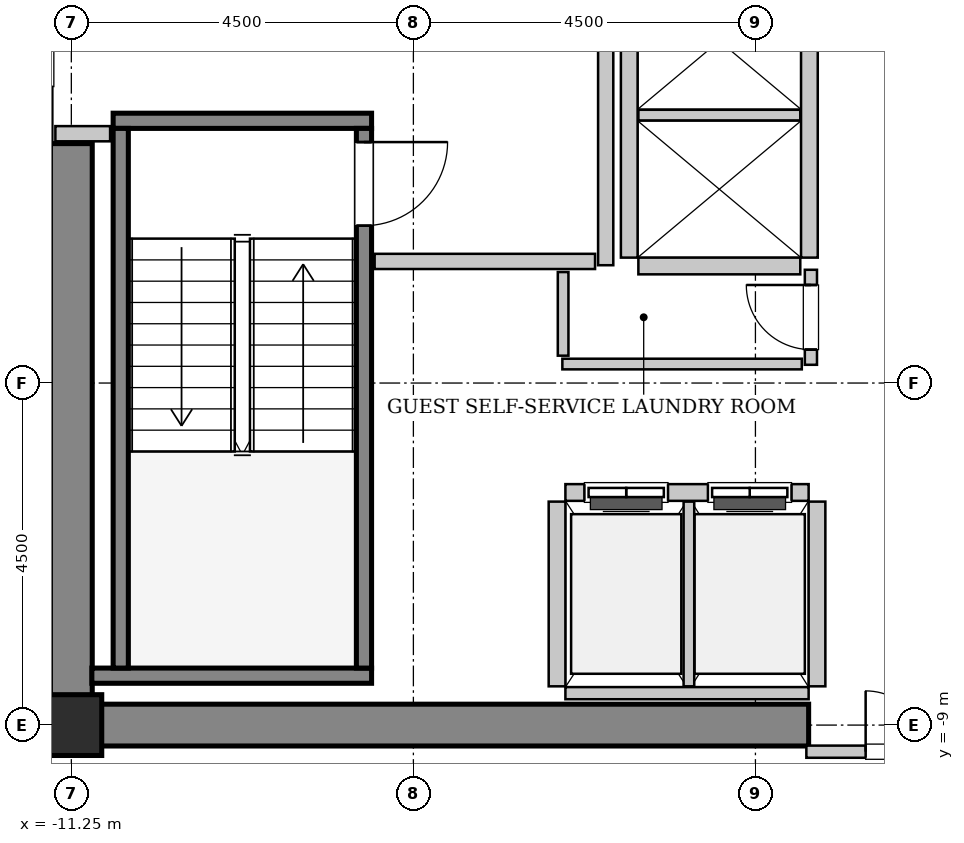
"""IFC4 building model, lengths in metres.
Left out: names, types, materials, properties, quantities, classifications, styles, units other than length and angle.
Written with IfcOpenShell. Run it as: python <this file> out.ifc"""

import sys

from ifc_helpers import new_model, si_unit, direction, frame, frame_2d, origin, origin_2d, place, context, subcontext, project, spatial, rectangle, hollow_rectangle, extrude, source, transform, mapped, element, fill, save


model = new_model("IFC4")
c1 = context("Model", 3, precision=1e-05, world=origin(), true_north=direction((0.0, 1.0)))
c2 = subcontext(c1, "Body", "Model", "MODEL_VIEW")
j1 = project(units=[si_unit("LENGTHUNIT", "METRE"), si_unit("PLANEANGLEUNIT", "RADIAN")], contexts=[c1])
p1 = place(None, origin())
s1 = spatial("IfcSite", under=j1, at=p1, CompositionType="ELEMENT")
p2 = place(p1, origin())
s2 = spatial("IfcBuilding", under=s1, at=p2, CompositionType="ELEMENT")
p3 = place(p2, frame((0.0, 0.0, 198.2)))
s3 = spatial("IfcBuildingStorey", under=s2, at=p3, CompositionType="ELEMENT", Elevation=198.2)
m1 = source(origin(), c2, "Body", "SweptSolid", [
    extrude(rectangle(XDim=9.975, YDim=0.55, at=frame_2d((4.987, 0.0))), origin(), (0.0, 0.0, 1.0), 3.8),
])
p4 = place(p3, frame((-11.525, -9.0, 0.0), z_axis=(0.0, 0.0, 1.0), x_axis=(1.0, 0.0, 0.0)))
e1 = element("IfcWall", 1, at=p4, inside=s3, PredefinedType="SHEAR", context=c2, shape_type="MappedRepresentation", body=[
    mapped(m1, transform((0.0, 0.0, 0.0), x_axis=(1.0, 0.0, 0.0), y_axis=(0.0, 1.0, 0.0), z_axis=(0.0, 0.0, 1.0), scale=1.0)),
])
m2 = source(origin(), c2, "Body", "SweptSolid", [
    extrude(rectangle(XDim=7.375, YDim=0.55, at=frame_2d((3.688, 0.0))), origin(), (0.0, 0.0, 1.0), 3.8),
])
p5 = place(p3, frame((-11.25, -8.725, 0.0), z_axis=(0.0, 0.0, 1.0), x_axis=(0.0, 1.0, 0.0)))
e2 = element("IfcWall", 2, at=p5, inside=s3, PredefinedType="SHEAR", context=c2, shape_type="MappedRepresentation", body=[
    mapped(m2, transform((0.0, 0.0, 0.0), x_axis=(1.0, 0.0, 0.0), y_axis=(0.0, 1.0, 0.0), z_axis=(0.0, 0.0, 1.0), scale=1.0)),
])
m3 = source(origin(), c2, "Body", "SweptSolid", [
    extrude(hollow_rectangle(XDim=0.8, YDim=0.8, WallThickness=0.04, InnerFilletRadius=0.04, OuterFilletRadius=0.08, at=origin_2d()), origin(), (0.0, 0.0, 1.0), 3.8),
])
p6 = place(p3, frame((-11.25, -9.0, 0.0), z_axis=(0.0, 0.0, 1.0), x_axis=(1.0, 0.0, 0.0)))
e3 = element("IfcColumn", 3, at=p6, inside=s3, PredefinedType="COLUMN", context=c2, shape_type="MappedRepresentation", body=[
    mapped(m3, transform((0.0, 0.0, 0.0), x_axis=(1.0, 0.0, 0.0), y_axis=(0.0, 1.0, 0.0), z_axis=(0.0, 0.0, 1.0), scale=1.0)),
])
m4 = source(origin(), c2, "Body", "SweptSolid", [
    extrude(rectangle(XDim=3.4, YDim=0.2, at=frame_2d((1.7, 0.0))), origin(), (0.0, 0.0, 1.0), 3.8),
])
p7 = place(p3, frame((-10.7, -1.05, 0.0), z_axis=(0.0, 0.0, 1.0), x_axis=(1.0, 0.0, 0.0)))
e4 = element("IfcWall", 4, at=p7, inside=s3, PredefinedType="SOLIDWALL", context=c2, shape_type="MappedRepresentation", body=[
    mapped(m4, transform((0.0, 0.0, 0.0), x_axis=(1.0, 0.0, 0.0), y_axis=(0.0, 1.0, 0.0), z_axis=(0.0, 0.0, 1.0), scale=1.0)),
])
m5 = source(origin(), c2, "Body", "SweptSolid", [
    extrude(rectangle(XDim=3.68, YDim=0.2, at=frame_2d((1.84, 0.0))), origin(), (0.0, 0.0, 1.0), 3.8),
])
p8 = place(p3, frame((-10.98, -8.35, 0.0), z_axis=(0.0, 0.0, 1.0), x_axis=(1.0, 0.0, 0.0)))
e5 = element("IfcWall", 5, at=p8, inside=s3, PredefinedType="SOLIDWALL", context=c2, shape_type="MappedRepresentation", body=[
    mapped(m5, transform((0.0, 0.0, 0.0), x_axis=(1.0, 0.0, 0.0), y_axis=(0.0, 1.0, 0.0), z_axis=(0.0, 0.0, 1.0), scale=1.0)),
])
m6 = source(origin(), c2, "Body", "SweptSolid", [
    extrude(rectangle(XDim=7.1, YDim=0.2, at=frame_2d((3.55, 0.0))), origin(), (0.0, 0.0, 1.0), 3.8),
])
p9 = place(p3, frame((-10.6, -1.15, 0.0), z_axis=(0.0, 0.0, 1.0), x_axis=(0.0, -1.0, 0.0)))
e6 = element("IfcWall", 6, at=p9, inside=s3, PredefinedType="SOLIDWALL", context=c2, shape_type="MappedRepresentation", body=[
    mapped(m6, transform((0.0, 0.0, 0.0), x_axis=(1.0, 0.0, 0.0), y_axis=(0.0, 1.0, 0.0), z_axis=(0.0, 0.0, 1.0), scale=1.0)),
])
p10 = place(p3, frame((-7.4, -1.15, 0.0), z_axis=(0.0, 0.0, 1.0), x_axis=(0.0, -1.0, 0.0)))
e7 = element("IfcWall", 7, at=p10, inside=s3, PredefinedType="SOLIDWALL", context=c2, shape_type="MappedRepresentation", body=[
    mapped(m6, transform((0.0, 0.0, 0.0), x_axis=(1.0, 0.0, 0.0), y_axis=(0.0, 1.0, 0.0), z_axis=(0.0, 0.0, 1.0), scale=1.0)),
])
p11 = place(p10, frame((0.18, 0.0, 0.0)))
e8 = element("IfcOpeningElement", 8, at=p11, cuts=e7, PredefinedType="OPENING", context=c2, shape_type="SweptSolid", body=[
    extrude(rectangle(XDim=1.1, YDim=2.15, at=frame_2d((0.55, 1.075))), frame((0.0, 0.11, 0.0), z_axis=(0.0, -1.0, 0.0), x_axis=(1.0, 0.0, 0.0)), (0.0, 0.0, 1.0), 0.22),
])
m7 = source(origin(), c2, "Body", "SweptSolid", [
    extrude(rectangle(XDim=3.2, YDim=0.22, at=frame_2d((1.6, 0.0))), origin(), (0.0, 0.0, 1.0), 3.485),
])
p12 = place(p3, frame((-1.55, -5.94, 0.0), z_axis=(0.0, 0.0, 1.0), x_axis=(-1.0, 0.0, 0.0)))
e9 = element("IfcWall", 9, at=p12, inside=s3, PredefinedType="SOLIDWALL", context=c2, shape_type="MappedRepresentation", body=[
    mapped(m7, transform((0.0, 0.0, 0.0), x_axis=(1.0, 0.0, 0.0), y_axis=(0.0, 1.0, 0.0), z_axis=(0.0, 0.0, 1.0), scale=1.0)),
])
p13 = place(p12, frame((1.85, 0.0, 0.0)))
e10 = element("IfcOpeningElement", 10, at=p13, cuts=e9, PredefinedType="OPENING", context=c2, shape_type="SweptSolid", body=[
    extrude(rectangle(XDim=1.1, YDim=2.2, at=frame_2d((0.55, 1.1))), frame((0.0, 0.12, 0.0), z_axis=(0.0, -1.0, 0.0), x_axis=(1.0, 0.0, 0.0)), (0.0, 0.0, 1.0), 0.24),
])
p14 = place(p12, frame((0.225, 0.0, 0.0)))
e11 = element("IfcOpeningElement", 11, at=p14, cuts=e9, PredefinedType="OPENING", context=c2, shape_type="SweptSolid", body=[
    extrude(rectangle(XDim=1.1, YDim=2.2, at=frame_2d((0.55, 1.1))), frame((0.0, 0.12, 0.0), z_axis=(0.0, -1.0, 0.0), x_axis=(1.0, 0.0, 0.0)), (0.0, 0.0, 1.0), 0.24),
])
m8 = source(origin(), c2, "Body", "SweptSolid", [
    extrude(rectangle(XDim=3.2, YDim=0.16, at=frame_2d((1.6, 0.0))), origin(), (0.0, 0.0, 1.0), 2.375),
])
p15 = place(p3, frame((-4.75, -8.58, 0.0), z_axis=(0.0, 0.0, 1.0), x_axis=(1.0, 0.0, 0.0)))
e12 = element("IfcWall", 12, at=p15, inside=s3, PredefinedType="PARTITIONING", context=c2, shape_type="MappedRepresentation", body=[
    mapped(m8, transform((0.0, 0.0, 0.0), x_axis=(1.0, 0.0, 0.0), y_axis=(0.0, 1.0, 0.0), z_axis=(0.0, 0.0, 1.0), scale=1.0)),
])
m9 = source(origin(), c2, "Body", "SweptSolid", [
    extrude(rectangle(XDim=2.43, YDim=0.22, at=frame_2d((1.215, 0.0))), origin(), (0.0, 0.0, 1.0), 3.485),
])
p16 = place(p3, frame((-4.86, -6.06, 0.0), z_axis=(0.0, 0.0, 1.0), x_axis=(0.0, -1.0, 0.0)))
e13 = element("IfcWall", 13, at=p16, inside=s3, PredefinedType="SOLIDWALL", context=c2, shape_type="MappedRepresentation", body=[
    mapped(m9, transform((0.0, 0.0, 0.0), x_axis=(1.0, 0.0, 0.0), y_axis=(0.0, 1.0, 0.0), z_axis=(0.0, 0.0, 1.0), scale=1.0)),
])
m10 = source(origin(), c2, "Body", "SweptSolid", [
    extrude(rectangle(XDim=2.43, YDim=0.14, at=frame_2d((1.215, 0.0))), origin(), (0.0, 0.0, 1.0), 3.485),
])
p17 = place(p3, frame((-3.125, -8.49, 0.0), z_axis=(0.0, 0.0, 1.0), x_axis=(0.0, 1.0, 0.0)))
e14 = element("IfcWall", 14, at=p17, inside=s3, PredefinedType="PARTITIONING", context=c2, shape_type="MappedRepresentation", body=[
    mapped(m10, transform((0.0, 0.0, 0.0), x_axis=(1.0, 0.0, 0.0), y_axis=(0.0, 1.0, 0.0), z_axis=(0.0, 0.0, 1.0), scale=1.0)),
])
p18 = place(p3, frame((-1.44, -8.49, 0.0), z_axis=(0.0, 0.0, 1.0), x_axis=(0.0, 1.0, 0.0)))
e15 = element("IfcWall", 15, at=p18, inside=s3, PredefinedType="SOLIDWALL", context=c2, shape_type="MappedRepresentation", body=[
    mapped(m9, transform((0.0, 0.0, 0.0), x_axis=(1.0, 0.0, 0.0), y_axis=(0.0, 1.0, 0.0), z_axis=(0.0, 0.0, 1.0), scale=1.0)),
])
m11 = source(origin(), c2, "Body", "SweptSolid", [
    extrude(rectangle(XDim=5.7, YDim=0.22, at=frame_2d((2.85, 0.0))), origin(), (0.0, 0.0, 1.0), 3.485),
])
for number, where, z_axis, x_axis in (
    (16, (-1.54, -2.85, 0.0), (0.0, 0.0, 1.0), (0.0, 1.0, 0.0)),
    (17, (-3.91, 2.85, 0.0), (0.0, 0.0, 1.0), (0.0, -1.0, 0.0)),
):
    element("IfcWall", number, at=place(p3, frame(where, z_axis=z_axis, x_axis=x_axis)), inside=s3, PredefinedType="SOLIDWALL", context=c2, shape_type="MappedRepresentation", body=[
        mapped(m11, transform((0.0, 0.0, 0.0), x_axis=(1.0, 0.0, 0.0), y_axis=(0.0, 1.0, 0.0), z_axis=(0.0, 0.0, 1.0), scale=1.0)),
    ])
m12 = source(origin(), c2, "Body", "SweptSolid", [
    extrude(rectangle(XDim=2.13, YDim=0.22, at=frame_2d((1.065, 0.0))), origin(), (0.0, 0.0, 1.0), 3.485),
])
p19 = place(p3, frame((-3.79, -2.96, 0.0), z_axis=(0.0, 0.0, 1.0), x_axis=(1.0, 0.0, 0.0)))
e18 = element("IfcWall", 18, at=p19, inside=s3, PredefinedType="SOLIDWALL", context=c2, shape_type="MappedRepresentation", body=[
    mapped(m12, transform((0.0, 0.0, 0.0), x_axis=(1.0, 0.0, 0.0), y_axis=(0.0, 1.0, 0.0), z_axis=(0.0, 0.0, 1.0), scale=1.0)),
])
m13 = source(origin(), c2, "Body", "SweptSolid", [
    extrude(rectangle(XDim=2.13, YDim=0.14, at=frame_2d((1.065, 0.0))), origin(), (0.0, 0.0, 1.0), 3.485),
])
p20 = place(p3, frame((-3.79, -0.975, 0.0), z_axis=(0.0, 0.0, 1.0), x_axis=(1.0, 0.0, 0.0)))
e19 = element("IfcWall", 19, at=p20, inside=s3, PredefinedType="PARTITIONING", context=c2, shape_type="MappedRepresentation", body=[
    mapped(m13, transform((0.0, 0.0, 0.0), x_axis=(1.0, 0.0, 0.0), y_axis=(0.0, 1.0, 0.0), z_axis=(0.0, 0.0, 1.0), scale=1.0)),
])
m14 = source(origin(), c2, "Body", "SweptSolid", [
    extrude(rectangle(XDim=5.9, YDim=0.2, at=frame_2d((2.95, 0.0))), origin(), (0.0, 0.0, 1.0), 3.485),
])
p21 = place(p3, frame((-4.22, -2.95, 0.0), z_axis=(0.0, 0.0, 1.0), x_axis=(0.0, 1.0, 0.0)))
e20 = element("IfcWall", 20, at=p21, inside=s3, PredefinedType="PARTITIONING", context=c2, shape_type="MappedRepresentation", body=[
    mapped(m14, transform((0.0, 0.0, 0.0), x_axis=(1.0, 0.0, 0.0), y_axis=(0.0, 1.0, 0.0), z_axis=(0.0, 0.0, 1.0), scale=1.0)),
])
m15 = source(origin(), c2, "Body", "SweptSolid", [
    extrude(rectangle(XDim=2.9, YDim=0.2, at=frame_2d((1.45, 0.0))), origin(), (0.0, 0.0, 1.0), 3.485),
])
p22 = place(p3, frame((-7.26, -2.9, 0.0), z_axis=(0.0, 0.0, 1.0), x_axis=(1.0, 0.0, 0.0)))
e21 = element("IfcWall", 21, at=p22, inside=s3, PredefinedType="PARTITIONING", context=c2, shape_type="MappedRepresentation", body=[
    mapped(m15, transform((0.0, 0.0, 0.0), x_axis=(1.0, 0.0, 0.0), y_axis=(0.0, 1.0, 0.0), z_axis=(0.0, 0.0, 1.0), scale=1.0)),
])
m16 = source(origin(), c2, "Body", "SweptSolid", [
    extrude(rectangle(XDim=0.72, YDim=0.2, at=frame_2d((0.36, 0.0))), origin(), (0.0, 0.0, 1.0), 3.485),
])
p23 = place(p3, frame((-11.46, -1.22, 0.0), z_axis=(0.0, 0.0, 1.0), x_axis=(1.0, 0.0, 0.0)))
e22 = element("IfcWall", 22, at=p23, inside=s3, PredefinedType="PARTITIONING", context=c2, shape_type="MappedRepresentation", body=[
    mapped(m16, transform((0.0, 0.0, 0.0), x_axis=(1.0, 0.0, 0.0), y_axis=(0.0, 1.0, 0.0), z_axis=(0.0, 0.0, 1.0), scale=1.0)),
])
m17 = source(origin(), c2, "Body", "SweptSolid", [
    extrude(rectangle(XDim=3.16, YDim=0.16, at=frame_2d((1.58, 0.0))), origin(), (0.0, 0.0, 1.0), 2.375),
])
p24 = place(p3, frame((-1.58, -9.35, 0.0), z_axis=(0.0, 0.0, 1.0), x_axis=(1.0, 0.0, 0.0)))
e23 = element("IfcWall", 23, at=p24, inside=s3, PredefinedType="PARTITIONING", context=c2, shape_type="MappedRepresentation", body=[
    mapped(m17, transform((0.0, 0.0, 0.0), x_axis=(1.0, 0.0, 0.0), y_axis=(0.0, 1.0, 0.0), z_axis=(0.0, 0.0, 1.0), scale=1.0)),
])
p25 = place(p24, frame((0.78, 0.0, 0.0)))
e24 = element("IfcOpeningElement", 24, at=p25, cuts=e23, PredefinedType="OPENING", context=c2, shape_type="SweptSolid", body=[
    extrude(rectangle(XDim=1.6, YDim=2.3, at=frame_2d((0.8, 1.15))), frame((0.0, 0.09, 0.0), z_axis=(0.0, -1.0, 0.0), x_axis=(1.0, 0.0, 0.0)), (0.0, 0.0, 1.0), 0.18),
])
m18 = source(origin(), c2, "Body", "SweptSolid", [
    extrude(rectangle(XDim=1.25, YDim=0.16, at=frame_2d((0.625, 0.0))), origin(), (0.0, 0.0, 1.0), 3.485),
])
p26 = place(p3, frame((-1.52, -4.26, 0.0), z_axis=(0.0, 0.0, 1.0), x_axis=(0.0, 1.0, 0.0)))
e25 = element("IfcWall", 25, at=p26, inside=s3, PredefinedType="PARTITIONING", context=c2, shape_type="MappedRepresentation", body=[
    mapped(m18, transform((0.0, 0.0, 0.0), x_axis=(1.0, 0.0, 0.0), y_axis=(0.0, 1.0, 0.0), z_axis=(0.0, 0.0, 1.0), scale=1.0)),
])
p27 = place(p26, frame((0.2, 0.0, 0.0)))
e26 = element("IfcOpeningElement", 26, at=p27, cuts=e25, PredefinedType="OPENING", context=c2, shape_type="SweptSolid", body=[
    extrude(rectangle(XDim=0.85, YDim=2.1, at=frame_2d((0.425, 1.05))), frame((0.0, 0.09, 0.0), z_axis=(0.0, -1.0, 0.0), x_axis=(1.0, 0.0, 0.0)), (0.0, 0.0, 1.0), 0.18),
])
m19 = source(origin(), c2, "Body", "SweptSolid", [
    extrude(rectangle(XDim=3.15, YDim=0.14, at=frame_2d((1.575, 0.0))), origin(), (0.0, 0.0, 1.0), 3.485),
])
p28 = place(p3, frame((-4.79, -4.25, 0.0), z_axis=(0.0, 0.0, 1.0), x_axis=(1.0, 0.0, 0.0)))
e27 = element("IfcWall", 27, at=p28, inside=s3, PredefinedType="PARTITIONING", context=c2, shape_type="MappedRepresentation", body=[
    mapped(m19, transform((0.0, 0.0, 0.0), x_axis=(1.0, 0.0, 0.0), y_axis=(0.0, 1.0, 0.0), z_axis=(0.0, 0.0, 1.0), scale=1.0)),
])
m20 = source(origin(), c2, "Body", "SweptSolid", [
    extrude(rectangle(XDim=1.1, YDim=0.14, at=frame_2d((0.55, 0.0))), origin(), (0.0, 0.0, 1.0), 3.485),
])
p29 = place(p3, frame((-4.78, -4.14, 0.0), z_axis=(0.0, 0.0, 1.0), x_axis=(0.0, 1.0, 0.0)))
e28 = element("IfcWall", 28, at=p29, inside=s3, PredefinedType="PARTITIONING", context=c2, shape_type="MappedRepresentation", body=[
    mapped(m20, transform((0.0, 0.0, 0.0), x_axis=(1.0, 0.0, 0.0), y_axis=(0.0, 1.0, 0.0), z_axis=(0.0, 0.0, 1.0), scale=1.0)),
])
m21 = source(origin(), c2, "Body", "SweptSolid", [
    extrude(rectangle(XDim=1.1, YDim=2.15, at=frame_2d((0.55, 1.075))), frame((0.0, 0.025, 0.0), z_axis=(0.0, -1.0, 0.0), x_axis=(1.0, 0.0, 0.0)), (0.0, 0.0, 1.0), 0.05),
])
p30 = place(p11, origin())
e29 = element("IfcDoor", 29, at=p30, inside=s3, OperationType="SINGLE_SWING_LEFT", PredefinedType="DOOR", context=c2, shape_type="MappedRepresentation", body=[
    mapped(m21, transform((0.0, 0.0, 0.0), x_axis=(1.0, 0.0, 0.0), y_axis=(0.0, 1.0, 0.0), z_axis=(0.0, 0.0, 1.0), scale=1.0)),
])
fill(e8, e29)
m22 = source(origin(), c2, "Body", "SweptSolid", [
    extrude(rectangle(XDim=1.1, YDim=2.2, at=frame_2d((0.55, 1.1))), frame((0.0, 0.025, 0.0), z_axis=(0.0, -1.0, 0.0), x_axis=(1.0, 0.0, 0.0)), (0.0, 0.0, 1.0), 0.05),
])
p31 = place(p13, origin())
e30 = element("IfcDoor", 30, at=p31, inside=s3, OperationType="DOUBLE_DOOR_SLIDING", PredefinedType="DOOR", context=c2, shape_type="MappedRepresentation", body=[
    mapped(m22, transform((0.0, 0.0, 0.0), x_axis=(1.0, 0.0, 0.0), y_axis=(0.0, 1.0, 0.0), z_axis=(0.0, 0.0, 1.0), scale=1.0)),
])
fill(e10, e30)
p32 = place(p14, origin())
e31 = element("IfcDoor", 31, at=p32, inside=s3, OperationType="DOUBLE_DOOR_SLIDING", PredefinedType="DOOR", context=c2, shape_type="MappedRepresentation", body=[
    mapped(m22, transform((0.0, 0.0, 0.0), x_axis=(1.0, 0.0, 0.0), y_axis=(0.0, 1.0, 0.0), z_axis=(0.0, 0.0, 1.0), scale=1.0)),
])
fill(e11, e31)
m23 = source(origin(), c2, "Body", "SweptSolid", [
    extrude(rectangle(XDim=1.6, YDim=2.3, at=frame_2d((0.8, 1.15))), frame((0.0, 0.025, 0.0), z_axis=(0.0, -1.0, 0.0), x_axis=(1.0, 0.0, 0.0)), (0.0, 0.0, 1.0), 0.05),
])
p33 = place(p25, origin())
e32 = element("IfcDoor", 32, at=p33, inside=s3, OperationType="DOUBLE_DOOR_SINGLE_SWING", PredefinedType="DOOR", context=c2, shape_type="MappedRepresentation", body=[
    mapped(m23, transform((0.0, 0.0, 0.0), x_axis=(1.0, 0.0, 0.0), y_axis=(0.0, 1.0, 0.0), z_axis=(0.0, 0.0, 1.0), scale=1.0)),
])
fill(e24, e32)
m24 = source(origin(), c2, "Body", "SweptSolid", [
    extrude(rectangle(XDim=0.85, YDim=2.1, at=frame_2d((0.425, 1.05))), frame((0.0, 0.025, 0.0), z_axis=(0.0, -1.0, 0.0), x_axis=(1.0, 0.0, 0.0)), (0.0, 0.0, 1.0), 0.05),
])
p34 = place(p27, origin())
e33 = element("IfcDoor", 33, at=p34, inside=s3, OperationType="SINGLE_SWING_RIGHT", PredefinedType="DOOR", context=c2, shape_type="MappedRepresentation", body=[
    mapped(m24, transform((0.0, 0.0, 0.0), x_axis=(1.0, 0.0, 0.0), y_axis=(0.0, 1.0, 0.0), z_axis=(0.0, 0.0, 1.0), scale=1.0)),
])
fill(e26, e33)
save(model, sys.argv[1])
